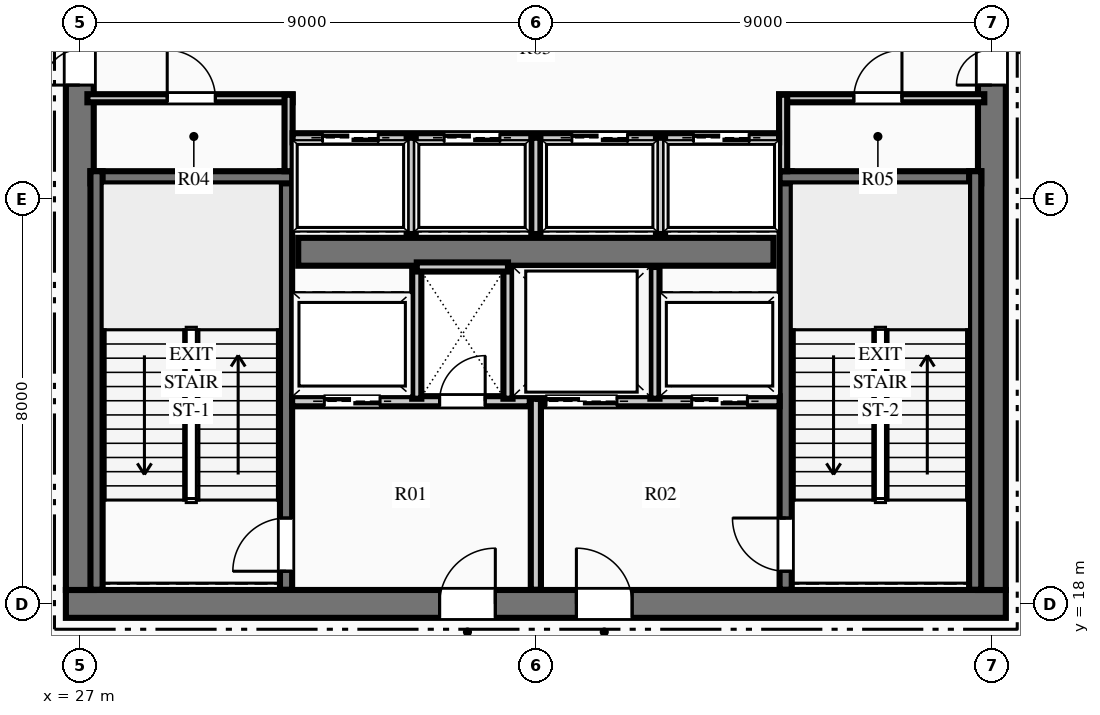
"""IFC4 building model, lengths in metres.
Left out: names, types, materials, properties, quantities, classifications, styles, units other than length and angle.
Written with IfcOpenShell. Run it as: python <this file> out.ifc"""

import sys

from ifc_helpers import new_model, si_unit, direction, frame, frame_2d, origin, place, context, subcontext, project, spatial, rectangle, extrude, element, fill, save


model = new_model("IFC4")
c1 = context("Model", 3, precision=1e-05, world=origin(), true_north=direction((0.0, 1.0)))
c2 = subcontext(c1, "Body", "Model", "MODEL_VIEW")
j1 = project(units=[si_unit("LENGTHUNIT", "METRE"), si_unit("PLANEANGLEUNIT", "RADIAN")], contexts=[c1])
p1 = place(None, origin())
s1 = spatial("IfcSite", under=j1, at=p1, CompositionType="ELEMENT")
p2 = place(p1, origin())
s2 = spatial("IfcBuilding", under=s1, at=p2, CompositionType="ELEMENT")
p3 = place(p2, frame((0.0, 0.0, 81.45)))
s3 = spatial("IfcBuildingStorey", under=s2, at=p3, CompositionType="ELEMENT", Elevation=81.45)
p4 = place(p3, frame((26.725, 18.0, 0.0), z_axis=(0.0, 0.0, 1.0), x_axis=(1.0, 0.0, 0.0)))
e1 = element("IfcWall", 1, at=p4, inside=s3, PredefinedType="SHEAR", context=c2, shape_type="SweptSolid", body=[
    extrude(rectangle(XDim=18.55, YDim=0.55, at=frame_2d((9.275, 0.0))), origin(), (0.0, 0.0, 1.0), 4.5),
])
p5 = place(p4, frame((7.375, 0.0, 0.0)))
e2 = element("IfcOpeningElement", 2, at=p5, cuts=e1, PredefinedType="OPENING", context=c2, shape_type="SweptSolid", body=[
    extrude(rectangle(XDim=1.1, YDim=2.15, at=frame_2d((0.55, 1.075))), frame((0.0, 0.285, 0.0), z_axis=(0.0, -1.0, 0.0), x_axis=(1.0, 0.0, 0.0)), (0.0, 0.0, 1.0), 0.57),
])
p6 = place(p4, frame((10.075, 0.0, 0.0)))
e3 = element("IfcOpeningElement", 3, at=p6, cuts=e1, PredefinedType="OPENING", context=c2, shape_type="SweptSolid", body=[
    extrude(rectangle(XDim=1.1, YDim=2.15, at=frame_2d((0.55, 1.075))), frame((0.0, 0.285, 0.0), z_axis=(0.0, -1.0, 0.0), x_axis=(1.0, 0.0, 0.0)), (0.0, 0.0, 1.0), 0.57),
])
p7 = place(p3, frame((27.0, 18.275, 0.0), z_axis=(0.0, 0.0, 1.0), x_axis=(0.0, 1.0, 0.0)))
e4 = element("IfcWall", 4, at=p7, inside=s3, PredefinedType="SHEAR", context=c2, shape_type="SweptSolid", body=[
    extrude(rectangle(XDim=15.45, YDim=0.55, at=frame_2d((7.725, 0.0))), origin(), (0.0, 0.0, 1.0), 4.5),
])
p8 = place(p7, frame((9.965, 0.0, 0.0)))
e5 = element("IfcOpeningElement", 5, at=p8, cuts=e4, PredefinedType="OPENING", context=c2, shape_type="SweptSolid", body=[
    extrude(rectangle(XDim=1.4, YDim=2.2, at=frame_2d((0.7, 1.1))), frame((0.0, 0.285, 0.0), z_axis=(0.0, -1.0, 0.0), x_axis=(1.0, 0.0, 0.0)), (0.0, 0.0, 1.0), 0.57),
])
p9 = place(p3, frame((45.0, 18.275, 0.0), z_axis=(0.0, 0.0, 1.0), x_axis=(0.0, 1.0, 0.0)))
e6 = element("IfcWall", 6, at=p9, inside=s3, PredefinedType="SHEAR", context=c2, shape_type="SweptSolid", body=[
    extrude(rectangle(XDim=15.45, YDim=0.55, at=frame_2d((7.725, 0.0))), origin(), (0.0, 0.0, 1.0), 4.5),
])
p10 = place(p9, frame((9.965, 0.0, 0.0)))
e7 = element("IfcOpeningElement", 7, at=p10, cuts=e6, PredefinedType="OPENING", context=c2, shape_type="SweptSolid", body=[
    extrude(rectangle(XDim=1.4, YDim=2.2, at=frame_2d((0.7, 1.1))), frame((0.0, 0.285, 0.0), z_axis=(0.0, -1.0, 0.0), x_axis=(1.0, 0.0, 0.0)), (0.0, 0.0, 1.0), 0.57),
])
p11 = place(p3, frame((31.31, 24.95, 0.0), z_axis=(0.0, 0.0, 1.0), x_axis=(1.0, 0.0, 0.0)))
e8 = element("IfcWall", 8, at=p11, inside=s3, PredefinedType="SHEAR", context=c2, shape_type="SweptSolid", body=[
    extrude(rectangle(XDim=9.38, YDim=0.55, at=frame_2d((4.69, 0.0))), origin(), (0.0, 0.0, 1.0), 4.5),
])
p12 = place(p3, frame((31.07, 18.28, 0.0), z_axis=(0.0, 0.0, 1.0), x_axis=(0.0, 1.0, 0.0)))
e9 = element("IfcWall", 9, at=p12, inside=s3, PredefinedType="SHEAR", context=c2, shape_type="SweptSolid", body=[
    extrude(rectangle(XDim=8.26, YDim=0.24, at=frame_2d((4.13, 0.0))), origin(), (0.0, 0.0, 1.0), 4.5),
])
p13 = place(p12, frame((0.365, 0.0, 0.0)))
e10 = element("IfcOpeningElement", 10, at=p13, cuts=e9, PredefinedType="OPENING", context=c2, shape_type="SweptSolid", body=[
    extrude(rectangle(XDim=1.05, YDim=2.15, at=frame_2d((0.525, 1.075))), frame((0.0, 0.13, 0.0), z_axis=(0.0, -1.0, 0.0), x_axis=(1.0, 0.0, 0.0)), (0.0, 0.0, 1.0), 0.26),
])
p14 = place(p3, frame((27.21, 26.42, 0.0), z_axis=(0.0, 0.0, 1.0), x_axis=(1.0, 0.0, 0.0)))
e11 = element("IfcWall", 11, at=p14, inside=s3, PredefinedType="SHEAR", context=c2, shape_type="SweptSolid", body=[
    extrude(rectangle(XDim=3.98, YDim=0.24, at=frame_2d((1.99, 0.0))), origin(), (0.0, 0.0, 1.0), 4.5),
])
p15 = place(p3, frame((27.33, 18.28, 0.0), z_axis=(0.0, 0.0, 1.0), x_axis=(0.0, 1.0, 0.0)))
e12 = element("IfcWall", 12, at=p15, inside=s3, PredefinedType="SHEAR", context=c2, shape_type="SweptSolid", body=[
    extrude(rectangle(XDim=8.26, YDim=0.24, at=frame_2d((4.13, 0.0))), origin(), (0.0, 0.0, 1.0), 4.5),
])
p16 = place(p3, frame((40.93, 18.28, 0.0), z_axis=(0.0, 0.0, 1.0), x_axis=(0.0, 1.0, 0.0)))
e13 = element("IfcWall", 13, at=p16, inside=s3, PredefinedType="SHEAR", context=c2, shape_type="SweptSolid", body=[
    extrude(rectangle(XDim=8.26, YDim=0.24, at=frame_2d((4.13, 0.0))), origin(), (0.0, 0.0, 1.0), 4.5),
])
p17 = place(p16, frame((0.365, 0.0, 0.0)))
e14 = element("IfcOpeningElement", 14, at=p17, cuts=e13, PredefinedType="OPENING", context=c2, shape_type="SweptSolid", body=[
    extrude(rectangle(XDim=1.05, YDim=2.15, at=frame_2d((0.525, 1.075))), frame((0.0, 0.13, 0.0), z_axis=(0.0, -1.0, 0.0), x_axis=(1.0, 0.0, 0.0)), (0.0, 0.0, 1.0), 0.26),
])
p18 = place(p3, frame((40.81, 26.42, 0.0), z_axis=(0.0, 0.0, 1.0), x_axis=(1.0, 0.0, 0.0)))
e15 = element("IfcWall", 15, at=p18, inside=s3, PredefinedType="SHEAR", context=c2, shape_type="SweptSolid", body=[
    extrude(rectangle(XDim=3.98, YDim=0.24, at=frame_2d((1.99, 0.0))), origin(), (0.0, 0.0, 1.0), 4.5),
])
p19 = place(p3, frame((44.67, 18.28, 0.0), z_axis=(0.0, 0.0, 1.0), x_axis=(0.0, 1.0, 0.0)))
e16 = element("IfcWall", 16, at=p19, inside=s3, PredefinedType="SHEAR", context=c2, shape_type="SweptSolid", body=[
    extrude(rectangle(XDim=8.26, YDim=0.24, at=frame_2d((4.13, 0.0))), origin(), (0.0, 0.0, 1.0), 4.5),
])
p20 = place(p3, frame((36.0, 18.28, 0.0), z_axis=(0.0, 0.0, 1.0), x_axis=(0.0, 1.0, 0.0)))
e17 = element("IfcWall", 17, at=p20, inside=s3, PredefinedType="PARTITIONING", context=c2, shape_type="SweptSolid", body=[
    extrude(rectangle(XDim=3.77, YDim=0.2, at=frame_2d((1.885, 0.0))), origin(), (0.0, 0.0, 1.0), 4.09),
])
p21 = place(p3, frame((31.19, 22.0, 0.0), z_axis=(0.0, 0.0, 1.0), x_axis=(1.0, 0.0, 0.0)))
e18 = element("IfcWall", 18, at=p21, inside=s3, PredefinedType="PARTITIONING", context=c2, shape_type="SweptSolid", body=[
    extrude(rectangle(XDim=4.69, YDim=0.2, at=frame_2d((2.345, 0.0))), origin(), (0.0, 0.0, 1.0), 4.09),
])
p22 = place(p21, frame((2.91, 0.0, 0.0)))
e19 = element("IfcOpeningElement", 19, at=p22, cuts=e18, PredefinedType="OPENING", context=c2, shape_type="SweptSolid", body=[
    extrude(rectangle(XDim=0.9, YDim=2.15, at=frame_2d((0.45, 1.075))), frame((0.0, 0.11, 0.0), z_axis=(0.0, -1.0, 0.0), x_axis=(1.0, 0.0, 0.0)), (0.0, 0.0, 1.0), 0.22),
])
p23 = place(p21, frame((0.635, 0.0, 0.0)))
e20 = element("IfcOpeningElement", 20, at=p23, cuts=e18, PredefinedType="OPENING", context=c2, shape_type="SweptSolid", body=[
    extrude(rectangle(XDim=1.1, YDim=2.15, at=frame_2d((0.55, 1.075))), frame((0.0, 0.11, 0.0), z_axis=(0.0, -1.0, 0.0), x_axis=(1.0, 0.0, 0.0)), (0.0, 0.0, 1.0), 0.22),
])
p24 = place(p3, frame((36.12, 22.0, 0.0), z_axis=(0.0, 0.0, 1.0), x_axis=(1.0, 0.0, 0.0)))
e21 = element("IfcWall", 21, at=p24, inside=s3, PredefinedType="PARTITIONING", context=c2, shape_type="SweptSolid", body=[
    extrude(rectangle(XDim=4.69, YDim=0.2, at=frame_2d((2.345, 0.0))), origin(), (0.0, 0.0, 1.0), 4.09),
])
p25 = place(p24, frame((2.955, 0.0, 0.0)))
e22 = element("IfcOpeningElement", 22, at=p25, cuts=e21, PredefinedType="OPENING", context=c2, shape_type="SweptSolid", body=[
    extrude(rectangle(XDim=1.1, YDim=2.15, at=frame_2d((0.55, 1.075))), frame((0.0, 0.11, 0.0), z_axis=(0.0, -1.0, 0.0), x_axis=(1.0, 0.0, 0.0)), (0.0, 0.0, 1.0), 0.22),
])
p26 = place(p24, frame((0.08, 0.0, 0.0)))
e23 = element("IfcOpeningElement", 23, at=p26, cuts=e21, PredefinedType="OPENING", context=c2, shape_type="SweptSolid", body=[
    extrude(rectangle(XDim=1.4, YDim=2.2, at=frame_2d((0.7, 1.1))), frame((0.0, 0.11, 0.0), z_axis=(0.0, -1.0, 0.0), x_axis=(1.0, 0.0, 0.0)), (0.0, 0.0, 1.0), 0.22),
])
for number, where, z_axis, x_axis in (
    (24, (33.65, 22.05, 0.0), (0.0, 0.0, 1.0), (0.0, 1.0, 0.0)),
    (25, (35.45, 22.05, 0.0), (0.0, 0.0, 1.0), (0.0, 1.0, 0.0)),
):
    element("IfcWall", number, at=place(p3, frame(where, z_axis=z_axis, x_axis=x_axis)), inside=s3, PredefinedType="PARTITIONING", context=c2, shape_type="SweptSolid", body=[
        extrude(rectangle(XDim=2.6, YDim=0.18, at=frame_2d((1.3, 0.0))), origin(), (0.0, 0.0, 1.0), 4.09),
    ])
p27 = place(p3, frame((33.65, 24.65, 0.0), z_axis=(0.0, 0.0, 1.0), x_axis=(1.0, 0.0, 0.0)))
e26 = element("IfcWall", 26, at=p27, inside=s3, PredefinedType="PARTITIONING", context=c2, shape_type="SweptSolid", body=[
    extrude(rectangle(XDim=1.8, YDim=0.18, at=frame_2d((0.9, 0.0))), origin(), (0.0, 0.0, 1.0), 4.09),
])
p28 = place(p3, frame((38.35, 22.05, 0.0), z_axis=(0.0, 0.0, 1.0), x_axis=(0.0, 1.0, 0.0)))
e27 = element("IfcWall", 27, at=p28, inside=s3, PredefinedType="PARTITIONING", context=c2, shape_type="SweptSolid", body=[
    extrude(rectangle(XDim=2.6, YDim=0.18, at=frame_2d((1.3, 0.0))), origin(), (0.0, 0.0, 1.0), 4.09),
])
p29 = place(p3, frame((27.15, 27.98, 0.0), z_axis=(0.0, 0.0, 1.0), x_axis=(1.0, 0.0, 0.0)))
e28 = element("IfcWall", 28, at=p29, inside=s3, PredefinedType="PARTITIONING", context=c2, shape_type="SweptSolid", body=[
    extrude(rectangle(XDim=4.05, YDim=0.16, at=frame_2d((2.025, 0.0))), origin(), (0.0, 0.0, 1.0), 4.09),
])
p30 = place(p29, frame((1.575, 0.0, 0.0)))
e29 = element("IfcOpeningElement", 29, at=p30, cuts=e28, PredefinedType="OPENING", context=c2, shape_type="SweptSolid", body=[
    extrude(rectangle(XDim=0.95, YDim=2.15, at=frame_2d((0.475, 1.075))), frame((0.0, 0.09, 0.0), z_axis=(0.0, -1.0, 0.0), x_axis=(1.0, 0.0, 0.0)), (0.0, 0.0, 1.0), 0.18),
])
p31 = place(p3, frame((31.12, 26.54, 0.0), z_axis=(0.0, 0.0, 1.0), x_axis=(0.0, 1.0, 0.0)))
e30 = element("IfcWall", 30, at=p31, inside=s3, PredefinedType="PARTITIONING", context=c2, shape_type="SweptSolid", body=[
    extrude(rectangle(XDim=1.51, YDim=0.16, at=frame_2d((0.755, 0.0))), origin(), (0.0, 0.0, 1.0), 4.09),
])
p32 = place(p3, frame((40.8, 27.98, 0.0), z_axis=(0.0, 0.0, 1.0), x_axis=(1.0, 0.0, 0.0)))
e31 = element("IfcWall", 31, at=p32, inside=s3, PredefinedType="PARTITIONING", context=c2, shape_type="SweptSolid", body=[
    extrude(rectangle(XDim=4.05, YDim=0.16, at=frame_2d((2.025, 0.0))), origin(), (0.0, 0.0, 1.0), 4.09),
])
p33 = place(p32, frame((1.475, 0.0, 0.0)))
e32 = element("IfcOpeningElement", 32, at=p33, cuts=e31, PredefinedType="OPENING", context=c2, shape_type="SweptSolid", body=[
    extrude(rectangle(XDim=0.95, YDim=2.15, at=frame_2d((0.475, 1.075))), frame((0.0, 0.09, 0.0), z_axis=(0.0, -1.0, 0.0), x_axis=(1.0, 0.0, 0.0)), (0.0, 0.0, 1.0), 0.18),
])
p34 = place(p3, frame((40.88, 26.54, 0.0), z_axis=(0.0, 0.0, 1.0), x_axis=(0.0, 1.0, 0.0)))
e33 = element("IfcWall", 33, at=p34, inside=s3, PredefinedType="PARTITIONING", context=c2, shape_type="SweptSolid", body=[
    extrude(rectangle(XDim=1.51, YDim=0.16, at=frame_2d((0.755, 0.0))), origin(), (0.0, 0.0, 1.0), 4.09),
])
p35 = place(p3, frame((31.2, 27.2, 0.0), z_axis=(0.0, 0.0, 1.0), x_axis=(1.0, 0.0, 0.0)))
e34 = element("IfcWall", 34, at=p35, inside=s3, PredefinedType="PARTITIONING", context=c2, shape_type="SweptSolid", body=[
    extrude(rectangle(XDim=9.6, YDim=0.18, at=frame_2d((4.8, 0.0))), origin(), (0.0, 0.0, 1.0), 4.09),
])
p36 = place(p35, frame((0.59, 0.0, 0.0)))
e35 = element("IfcOpeningElement", 35, at=p36, cuts=e34, PredefinedType="OPENING", context=c2, shape_type="SweptSolid", body=[
    extrude(rectangle(XDim=1.1, YDim=2.15, at=frame_2d((0.55, 1.075))), frame((0.0, 0.1, 0.0), z_axis=(0.0, -1.0, 0.0), x_axis=(1.0, 0.0, 0.0)), (0.0, 0.0, 1.0), 0.2),
])
p37 = place(p35, frame((2.99, 0.0, 0.0)))
e36 = element("IfcOpeningElement", 36, at=p37, cuts=e34, PredefinedType="OPENING", context=c2, shape_type="SweptSolid", body=[
    extrude(rectangle(XDim=1.1, YDim=2.15, at=frame_2d((0.55, 1.075))), frame((0.0, 0.1, 0.0), z_axis=(0.0, -1.0, 0.0), x_axis=(1.0, 0.0, 0.0)), (0.0, 0.0, 1.0), 0.2),
])
p38 = place(p35, frame((5.51, 0.0, 0.0)))
e37 = element("IfcOpeningElement", 37, at=p38, cuts=e34, PredefinedType="OPENING", context=c2, shape_type="SweptSolid", body=[
    extrude(rectangle(XDim=1.1, YDim=2.15, at=frame_2d((0.55, 1.075))), frame((0.0, 0.1, 0.0), z_axis=(0.0, -1.0, 0.0), x_axis=(1.0, 0.0, 0.0)), (0.0, 0.0, 1.0), 0.2),
])
p39 = place(p35, frame((7.91, 0.0, 0.0)))
e38 = element("IfcOpeningElement", 38, at=p39, cuts=e34, PredefinedType="OPENING", context=c2, shape_type="SweptSolid", body=[
    extrude(rectangle(XDim=1.1, YDim=2.15, at=frame_2d((0.55, 1.075))), frame((0.0, 0.1, 0.0), z_axis=(0.0, -1.0, 0.0), x_axis=(1.0, 0.0, 0.0)), (0.0, 0.0, 1.0), 0.2),
])
for number, where, z_axis, x_axis in (
    (39, (33.54, 25.3, 0.0), (0.0, 0.0, 1.0), (0.0, 1.0, 0.0)),
    (40, (36.0, 25.3, 0.0), (0.0, 0.0, 1.0), (0.0, 1.0, 0.0)),
    (41, (38.46, 25.3, 0.0), (0.0, 0.0, 1.0), (0.0, 1.0, 0.0)),
):
    element("IfcWall", number, at=place(p3, frame(where, z_axis=z_axis, x_axis=x_axis)), inside=s3, PredefinedType="PARTITIONING", context=c2, shape_type="SweptSolid", body=[
        extrude(rectangle(XDim=1.9, YDim=0.18, at=frame_2d((0.95, 0.0))), origin(), (0.0, 0.0, 1.0), 4.09),
    ])
p40 = place(p30, origin())
e42 = element("IfcDoor", 42, at=p40, inside=s3, OperationType="SINGLE_SWING_LEFT", PredefinedType="DOOR", context=c2, shape_type="SweptSolid", body=[
    extrude(rectangle(XDim=0.95, YDim=2.15, at=frame_2d((0.475, 1.075))), frame((0.0, 0.025, 0.0), z_axis=(0.0, -1.0, 0.0), x_axis=(1.0, 0.0, 0.0)), (0.0, 0.0, 1.0), 0.05),
])
fill(e29, e42)
p41 = place(p33, origin())
e43 = element("IfcDoor", 43, at=p41, inside=s3, OperationType="SINGLE_SWING_RIGHT", PredefinedType="DOOR", context=c2, shape_type="SweptSolid", body=[
    extrude(rectangle(XDim=0.95, YDim=2.15, at=frame_2d((0.475, 1.075))), frame((0.0, 0.025, 0.0), z_axis=(0.0, -1.0, 0.0), x_axis=(1.0, 0.0, 0.0)), (0.0, 0.0, 1.0), 0.05),
])
fill(e32, e43)
p42 = place(p13, origin())
e44 = element("IfcDoor", 44, at=p42, inside=s3, OperationType="SINGLE_SWING_LEFT", PredefinedType="DOOR", context=c2, shape_type="SweptSolid", body=[
    extrude(rectangle(XDim=1.05, YDim=2.15, at=frame_2d((0.525, 1.075))), frame((0.0, 0.025, 0.0), z_axis=(0.0, -1.0, 0.0), x_axis=(1.0, 0.0, 0.0)), (0.0, 0.0, 1.0), 0.05),
])
fill(e10, e44)
p43 = place(p17, origin())
e45 = element("IfcDoor", 45, at=p43, inside=s3, OperationType="SINGLE_SWING_RIGHT", PredefinedType="DOOR", context=c2, shape_type="SweptSolid", body=[
    extrude(rectangle(XDim=1.05, YDim=2.15, at=frame_2d((0.525, 1.075))), frame((0.0, 0.025, 0.0), z_axis=(0.0, -1.0, 0.0), x_axis=(1.0, 0.0, 0.0)), (0.0, 0.0, 1.0), 0.05),
])
fill(e14, e45)
p44 = place(p5, origin())
e46 = element("IfcDoor", 46, at=p44, inside=s3, OperationType="SINGLE_SWING_RIGHT", PredefinedType="DOOR", context=c2, shape_type="SweptSolid", body=[
    extrude(rectangle(XDim=1.1, YDim=2.15, at=frame_2d((0.55, 1.075))), frame((0.0, 0.025, 0.0), z_axis=(0.0, -1.0, 0.0), x_axis=(1.0, 0.0, 0.0)), (0.0, 0.0, 1.0), 0.05),
])
fill(e2, e46)
p45 = place(p6, origin())
e47 = element("IfcDoor", 47, at=p45, inside=s3, OperationType="SINGLE_SWING_LEFT", PredefinedType="DOOR", context=c2, shape_type="SweptSolid", body=[
    extrude(rectangle(XDim=1.1, YDim=2.15, at=frame_2d((0.55, 1.075))), frame((0.0, 0.025, 0.0), z_axis=(0.0, -1.0, 0.0), x_axis=(1.0, 0.0, 0.0)), (0.0, 0.0, 1.0), 0.05),
])
fill(e3, e47)
p46 = place(p22, origin())
e48 = element("IfcDoor", 48, at=p46, inside=s3, OperationType="SINGLE_SWING_RIGHT", PredefinedType="DOOR", context=c2, shape_type="SweptSolid", body=[
    extrude(rectangle(XDim=0.9, YDim=2.15, at=frame_2d((0.45, 1.075))), frame((0.0, 0.025, 0.0), z_axis=(0.0, -1.0, 0.0), x_axis=(1.0, 0.0, 0.0)), (0.0, 0.0, 1.0), 0.05),
])
fill(e19, e48)
p47 = place(p8, origin())
e49 = element("IfcDoor", 49, at=p47, inside=s3, OperationType="DOUBLE_DOOR_SINGLE_SWING", PredefinedType="DOOR", context=c2, shape_type="SweptSolid", body=[
    extrude(rectangle(XDim=1.4, YDim=2.2, at=frame_2d((0.7, 1.1))), frame((0.0, 0.025, 0.0), z_axis=(0.0, -1.0, 0.0), x_axis=(1.0, 0.0, 0.0)), (0.0, 0.0, 1.0), 0.05),
])
fill(e5, e49)
p48 = place(p10, origin())
e50 = element("IfcDoor", 50, at=p48, inside=s3, OperationType="DOUBLE_DOOR_SINGLE_SWING", PredefinedType="DOOR", context=c2, shape_type="SweptSolid", body=[
    extrude(rectangle(XDim=1.4, YDim=2.2, at=frame_2d((0.7, 1.1))), frame((0.0, 0.025, 0.0), z_axis=(0.0, -1.0, 0.0), x_axis=(1.0, 0.0, 0.0)), (0.0, 0.0, 1.0), 0.05),
])
fill(e7, e50)
p49 = place(p36, origin())
e51 = element("IfcDoor", 51, at=p49, inside=s3, OperationType="SLIDING_TO_LEFT", PredefinedType="DOOR", context=c2, shape_type="SweptSolid", body=[
    extrude(rectangle(XDim=1.1, YDim=2.15, at=frame_2d((0.55, 1.075))), frame((0.0, 0.025, 0.0), z_axis=(0.0, -1.0, 0.0), x_axis=(1.0, 0.0, 0.0)), (0.0, 0.0, 1.0), 0.05),
])
fill(e35, e51)
p50 = place(p37, origin())
e52 = element("IfcDoor", 52, at=p50, inside=s3, OperationType="SLIDING_TO_LEFT", PredefinedType="DOOR", context=c2, shape_type="SweptSolid", body=[
    extrude(rectangle(XDim=1.1, YDim=2.15, at=frame_2d((0.55, 1.075))), frame((0.0, 0.025, 0.0), z_axis=(0.0, -1.0, 0.0), x_axis=(1.0, 0.0, 0.0)), (0.0, 0.0, 1.0), 0.05),
])
fill(e36, e52)
p51 = place(p38, origin())
e53 = element("IfcDoor", 53, at=p51, inside=s3, OperationType="SLIDING_TO_LEFT", PredefinedType="DOOR", context=c2, shape_type="SweptSolid", body=[
    extrude(rectangle(XDim=1.1, YDim=2.15, at=frame_2d((0.55, 1.075))), frame((0.0, 0.025, 0.0), z_axis=(0.0, -1.0, 0.0), x_axis=(1.0, 0.0, 0.0)), (0.0, 0.0, 1.0), 0.05),
])
fill(e37, e53)
p52 = place(p39, origin())
e54 = element("IfcDoor", 54, at=p52, inside=s3, OperationType="SLIDING_TO_LEFT", PredefinedType="DOOR", context=c2, shape_type="SweptSolid", body=[
    extrude(rectangle(XDim=1.1, YDim=2.15, at=frame_2d((0.55, 1.075))), frame((0.0, 0.025, 0.0), z_axis=(0.0, -1.0, 0.0), x_axis=(1.0, 0.0, 0.0)), (0.0, 0.0, 1.0), 0.05),
])
fill(e38, e54)
p53 = place(p23, origin())
e55 = element("IfcDoor", 55, at=p53, inside=s3, OperationType="SLIDING_TO_LEFT", PredefinedType="DOOR", context=c2, shape_type="SweptSolid", body=[
    extrude(rectangle(XDim=1.1, YDim=2.15, at=frame_2d((0.55, 1.075))), frame((0.0, 0.025, 0.0), z_axis=(0.0, -1.0, 0.0), x_axis=(1.0, 0.0, 0.0)), (0.0, 0.0, 1.0), 0.05),
])
fill(e20, e55)
p54 = place(p25, origin())
e56 = element("IfcDoor", 56, at=p54, inside=s3, OperationType="SLIDING_TO_LEFT", PredefinedType="DOOR", context=c2, shape_type="SweptSolid", body=[
    extrude(rectangle(XDim=1.1, YDim=2.15, at=frame_2d((0.55, 1.075))), frame((0.0, 0.025, 0.0), z_axis=(0.0, -1.0, 0.0), x_axis=(1.0, 0.0, 0.0)), (0.0, 0.0, 1.0), 0.05),
])
fill(e22, e56)
p55 = place(p26, origin())
e57 = element("IfcDoor", 57, at=p55, inside=s3, OperationType="SLIDING_TO_LEFT", PredefinedType="DOOR", context=c2, shape_type="SweptSolid", body=[
    extrude(rectangle(XDim=1.4, YDim=2.2, at=frame_2d((0.7, 1.1))), frame((0.0, 0.025, 0.0), z_axis=(0.0, -1.0, 0.0), x_axis=(1.0, 0.0, 0.0)), (0.0, 0.0, 1.0), 0.05),
])
fill(e23, e57)
save(model, sys.argv[1])
